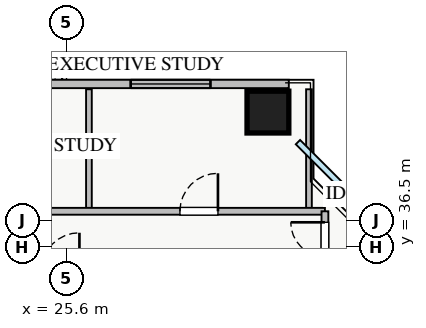
"""IFC4 building model, lengths in metres.
Left out: names, types, materials, properties, quantities, classifications, styles, units other than length and angle.
Written with IfcOpenShell. Run it as: python <this file> out.ifc"""

import sys

from ifc_helpers import new_model, si_unit, direction, frame, frame_2d, origin, origin_2d, place, context, subcontext, project, spatial, rectangle, extrude, source, transform, mapped, element, fill, save


model = new_model("IFC4")
c1 = context("Model", 3, precision=1e-05, world=origin(), true_north=direction((0.0, 1.0)))
c2 = subcontext(c1, "Body", "Model", "MODEL_VIEW")
j1 = project(units=[si_unit("LENGTHUNIT", "METRE"), si_unit("PLANEANGLEUNIT", "RADIAN")], contexts=[c1])
p1 = place(None, origin())
s1 = spatial("IfcSite", under=j1, at=p1, CompositionType="ELEMENT")
p2 = place(p1, origin())
s2 = spatial("IfcBuilding", under=s1, at=p2, CompositionType="ELEMENT")
p3 = place(p2, frame((0.0, 0.0, 97.0)))
s3 = spatial("IfcBuildingStorey", under=s2, at=p3, CompositionType="ELEMENT", Elevation=97.0)
m1 = source(origin(), c2, "Body", "SweptSolid", [
    extrude(rectangle(XDim=1.1, YDim=1.1, at=origin_2d()), origin(), (0.0, 0.0, 1.0), 3.25),
])
p4 = place(p3, frame((30.9, 40.05, 0.0), z_axis=(0.0, 0.0, 1.0), x_axis=(1.0, 0.0, 0.0)))
e1 = element("IfcColumn", 1, at=p4, inside=s3, PredefinedType="COLUMN", context=c2, shape_type="MappedRepresentation", body=[
    mapped(m1, transform((0.0, 0.0, 0.0), x_axis=(1.0, 0.0, 0.0), y_axis=(0.0, 1.0, 0.0), z_axis=(0.0, 0.0, 1.0), scale=1.0)),
])
p5 = place(p3, frame((6.55, 40.79, 0.0), z_axis=(0.0, 0.0, 1.0), x_axis=(1.0, 0.0, 0.0)))
e2 = element("IfcWall", 2, at=p5, inside=s3, PredefinedType="STANDARD", context=c2, shape_type="SweptSolid", body=[
    extrude(rectangle(XDim=24.9, YDim=0.22, at=frame_2d((12.45, 0.0))), origin(), (0.0, 0.0, 1.0), 2.61),
])
p6 = place(p5, frame((13.3, 0.0, 0.0)))
e3 = element("IfcOpeningElement", 3, at=p6, cuts=e2, PredefinedType="OPENING", context=c2, shape_type="SweptSolid", body=[
    extrude(rectangle(XDim=1.2, YDim=2.1, at=frame_2d((0.6, 1.05))), frame((0.0, 0.12, 0.0), z_axis=(0.0, -1.0, 0.0), x_axis=(1.0, 0.0, 0.0)), (0.0, 0.0, 1.0), 0.24),
])
p7 = place(p5, frame((0.393, 0.0, 0.9)))
e4 = element("IfcOpeningElement", 4, at=p7, cuts=e2, PredefinedType="OPENING", context=c2, shape_type="SweptSolid", body=[
    extrude(rectangle(XDim=1.5, YDim=1.5, at=frame_2d((0.75, 0.75))), frame((0.0, 0.12, 0.0), z_axis=(0.0, -1.0, 0.0), x_axis=(1.0, 0.0, 0.0)), (0.0, 0.0, 1.0), 0.24),
])
p8 = place(p5, frame((9.76, 0.0, 0.9)))
e5 = element("IfcOpeningElement", 5, at=p8, cuts=e2, PredefinedType="OPENING", context=c2, shape_type="SweptSolid", body=[
    extrude(rectangle(XDim=1.8, YDim=1.5, at=frame_2d((0.9, 0.75))), frame((0.0, 0.12, 0.0), z_axis=(0.0, -1.0, 0.0), x_axis=(1.0, 0.0, 0.0)), (0.0, 0.0, 1.0), 0.24),
])
p9 = place(p5, frame((14.813, 0.0, 0.9)))
e6 = element("IfcOpeningElement", 6, at=p9, cuts=e2, PredefinedType="OPENING", context=c2, shape_type="SweptSolid", body=[
    extrude(rectangle(XDim=1.5, YDim=1.45, at=frame_2d((0.75, 0.725))), frame((0.0, 0.12, 0.0), z_axis=(0.0, -1.0, 0.0), x_axis=(1.0, 0.0, 0.0)), (0.0, 0.0, 1.0), 0.24),
])
p10 = place(p5, frame((20.738, 0.0, 0.9)))
e7 = element("IfcOpeningElement", 7, at=p10, cuts=e2, PredefinedType="OPENING", context=c2, shape_type="SweptSolid", body=[
    extrude(rectangle(XDim=2.1, YDim=1.48, at=frame_2d((1.05, 0.74))), frame((0.0, 0.12, 0.0), z_axis=(0.0, -1.0, 0.0), x_axis=(1.0, 0.0, 0.0)), (0.0, 0.0, 1.0), 0.24),
])
p11 = place(p5, frame((4.171, 0.0, 0.9)))
e8 = element("IfcOpeningElement", 8, at=p11, cuts=e2, PredefinedType="OPENING", context=c2, shape_type="SweptSolid", body=[
    extrude(rectangle(XDim=2.4, YDim=1.5, at=frame_2d((1.2, 0.75))), frame((0.0, 0.12, 0.0), z_axis=(0.0, -1.0, 0.0), x_axis=(1.0, 0.0, 0.0)), (0.0, 0.0, 1.0), 0.24),
])
for number, where, z_axis, x_axis in (
    (9, (26.19, 37.44, 0.0), (0.0, 0.0, 1.0), (0.0, 1.0, 0.0)),
    (10, (31.98, 37.44, 0.0), (0.0, 0.0, 1.0), (0.0, 1.0, 0.0)),
):
    element("IfcWall", number, at=place(p3, frame(where, z_axis=z_axis, x_axis=x_axis)), inside=s3, PredefinedType="PARTITIONING", context=c2, shape_type="SweptSolid", body=[
        extrude(rectangle(XDim=3.21, YDim=0.15, at=frame_2d((1.605, 0.0))), origin(), (0.0, 0.0, 1.0), 3.07),
    ])
p12 = place(p3, frame((8.82, 37.44, 0.0), z_axis=(0.0, 0.0, 1.0), x_axis=(1.0, 0.0, 0.0)))
e11 = element("IfcWall", 11, at=p12, inside=s3, PredefinedType="PARTITIONING", context=c2, shape_type="SweptSolid", body=[
    extrude(rectangle(XDim=23.58, YDim=0.18, at=frame_2d((11.79, 0.0))), origin(), (0.0, 0.0, 1.0), 3.07),
])
p13 = place(p12, frame((2.75, 0.0, 0.0)))
e12 = element("IfcOpeningElement", 12, at=p13, cuts=e11, PredefinedType="OPENING", context=c2, shape_type="SweptSolid", body=[
    extrude(rectangle(XDim=1.0, YDim=2.05, at=frame_2d((0.5, 1.025))), frame((0.0, 0.1, 0.0), z_axis=(0.0, -1.0, 0.0), x_axis=(1.0, 0.0, 0.0)), (0.0, 0.0, 1.0), 0.2),
])
p14 = place(p12, frame((7.89, 0.0, 0.0)))
e13 = element("IfcOpeningElement", 13, at=p14, cuts=e11, PredefinedType="OPENING", context=c2, shape_type="SweptSolid", body=[
    extrude(rectangle(XDim=1.0, YDim=2.05, at=frame_2d((0.5, 1.025))), frame((0.0, 0.1, 0.0), z_axis=(0.0, -1.0, 0.0), x_axis=(1.0, 0.0, 0.0)), (0.0, 0.0, 1.0), 0.2),
])
p15 = place(p12, frame((13.325, 0.0, 0.0)))
e14 = element("IfcOpeningElement", 14, at=p15, cuts=e11, PredefinedType="OPENING", context=c2, shape_type="SweptSolid", body=[
    extrude(rectangle(XDim=1.0, YDim=2.05, at=frame_2d((0.5, 1.025))), frame((0.0, 0.1, 0.0), z_axis=(0.0, -1.0, 0.0), x_axis=(1.0, 0.0, 0.0)), (0.0, 0.0, 1.0), 0.2),
])
p16 = place(p12, frame((19.765, 0.0, 0.0)))
e15 = element("IfcOpeningElement", 15, at=p16, cuts=e11, PredefinedType="OPENING", context=c2, shape_type="SweptSolid", body=[
    extrude(rectangle(XDim=1.0, YDim=2.05, at=frame_2d((0.5, 1.025))), frame((0.0, 0.1, 0.0), z_axis=(0.0, -1.0, 0.0), x_axis=(1.0, 0.0, 0.0)), (0.0, 0.0, 1.0), 0.2),
])
p17 = place(p3, frame((32.4, 8.31, 0.0), z_axis=(0.0, 0.0, 1.0), x_axis=(0.0, 1.0, 0.0)))
e16 = element("IfcWall", 16, at=p17, inside=s3, PredefinedType="PARTITIONING", context=c2, shape_type="SweptSolid", body=[
    extrude(rectangle(XDim=29.13, YDim=0.18, at=frame_2d((14.565, 0.0))), origin(), (0.0, 0.0, 1.0), 3.07),
])
p18 = place(p17, frame((27.94, 0.0, 0.0)))
e17 = element("IfcOpeningElement", 17, at=p18, cuts=e16, PredefinedType="OPENING", context=c2, shape_type="SweptSolid", body=[
    extrude(rectangle(XDim=0.9, YDim=2.05, at=frame_2d((0.45, 1.025))), frame((0.0, 0.1, 0.0), z_axis=(0.0, -1.0, 0.0), x_axis=(1.0, 0.0, 0.0)), (0.0, 0.0, 1.0), 0.2),
])
p19 = place(p17, frame((0.415, 0.0, 0.0)))
e18 = element("IfcOpeningElement", 18, at=p19, cuts=e16, PredefinedType="OPENING", context=c2, shape_type="SweptSolid", body=[
    extrude(rectangle(XDim=0.9, YDim=2.05, at=frame_2d((0.45, 1.025))), frame((0.0, 0.1, 0.0), z_axis=(0.0, -1.0, 0.0), x_axis=(1.0, 0.0, 0.0)), (0.0, 0.0, 1.0), 0.2),
])
p20 = place(p17, frame((5.88, 0.0, 0.0)))
e19 = element("IfcOpeningElement", 19, at=p20, cuts=e16, PredefinedType="OPENING", context=c2, shape_type="SweptSolid", body=[
    extrude(rectangle(XDim=1.0, YDim=2.05, at=frame_2d((0.5, 1.025))), frame((0.0, 0.1, 0.0), z_axis=(0.0, -1.0, 0.0), x_axis=(1.0, 0.0, 0.0)), (0.0, 0.0, 1.0), 0.2),
])
p21 = place(p17, frame((12.23, 0.0, 0.0)))
e20 = element("IfcOpeningElement", 20, at=p21, cuts=e16, PredefinedType="OPENING", context=c2, shape_type="SweptSolid", body=[
    extrude(rectangle(XDim=1.0, YDim=2.05, at=frame_2d((0.5, 1.025))), frame((0.0, 0.1, 0.0), z_axis=(0.0, -1.0, 0.0), x_axis=(1.0, 0.0, 0.0)), (0.0, 0.0, 1.0), 0.2),
])
p22 = place(p17, frame((20.835, 0.0, 0.0)))
e21 = element("IfcOpeningElement", 21, at=p22, cuts=e16, PredefinedType="OPENING", context=c2, shape_type="SweptSolid", body=[
    extrude(rectangle(XDim=1.0, YDim=2.05, at=frame_2d((0.5, 1.025))), frame((0.0, 0.1, 0.0), z_axis=(0.0, -1.0, 0.0), x_axis=(1.0, 0.0, 0.0)), (0.0, 0.0, 1.0), 0.2),
])
m2 = source(origin(), c2, "Body", "SweptSolid", [
    extrude(rectangle(XDim=2.1, YDim=1.48, at=frame_2d((1.05, 0.74))), frame((0.0, 0.03, 0.0), z_axis=(0.0, -1.0, 0.0), x_axis=(1.0, 0.0, 0.0)), (0.0, 0.0, 1.0), 0.06),
])
p23 = place(p10, origin())
e22 = element("IfcWindow", 22, at=p23, inside=s3, PartitioningType="TRIPLE_PANEL_VERTICAL", PredefinedType="WINDOW", context=c2, shape_type="MappedRepresentation", body=[
    mapped(m2, transform((0.0, 0.0, 0.0), x_axis=(1.0, 0.0, 0.0), y_axis=(0.0, 1.0, 0.0), z_axis=(0.0, 0.0, 1.0), scale=1.0)),
])
fill(e7, e22)
m3 = source(origin(), c2, "Body", "SweptSolid", [
    extrude(rectangle(XDim=1.0, YDim=2.05, at=frame_2d((0.5, 1.025))), frame((0.0, 0.025, 0.0), z_axis=(0.0, -1.0, 0.0), x_axis=(1.0, 0.0, 0.0)), (0.0, 0.0, 1.0), 0.05),
])
p24 = place(p16, origin())
e23 = element("IfcDoor", 23, at=p24, inside=s3, OperationType="SINGLE_SWING_RIGHT", PredefinedType="DOOR", context=c2, shape_type="MappedRepresentation", body=[
    mapped(m3, transform((0.0, 0.0, 0.0), x_axis=(1.0, 0.0, 0.0), y_axis=(0.0, 1.0, 0.0), z_axis=(0.0, 0.0, 1.0), scale=1.0)),
])
fill(e15, e23)
m4 = source(origin(), c2, "Body", "SweptSolid", [
    extrude(rectangle(XDim=0.9, YDim=2.05, at=frame_2d((0.45, 1.025))), frame((0.0, 0.025, 0.0), z_axis=(0.0, -1.0, 0.0), x_axis=(1.0, 0.0, 0.0)), (0.0, 0.0, 1.0), 0.05),
])
p25 = place(p18, origin())
e24 = element("IfcDoor", 24, at=p25, inside=s3, OperationType="SINGLE_SWING_RIGHT", PredefinedType="DOOR", context=c2, shape_type="MappedRepresentation", body=[
    mapped(m4, transform((0.0, 0.0, 0.0), x_axis=(1.0, 0.0, 0.0), y_axis=(0.0, 1.0, 0.0), z_axis=(0.0, 0.0, 1.0), scale=1.0)),
])
fill(e17, e24)
save(model, sys.argv[1])
